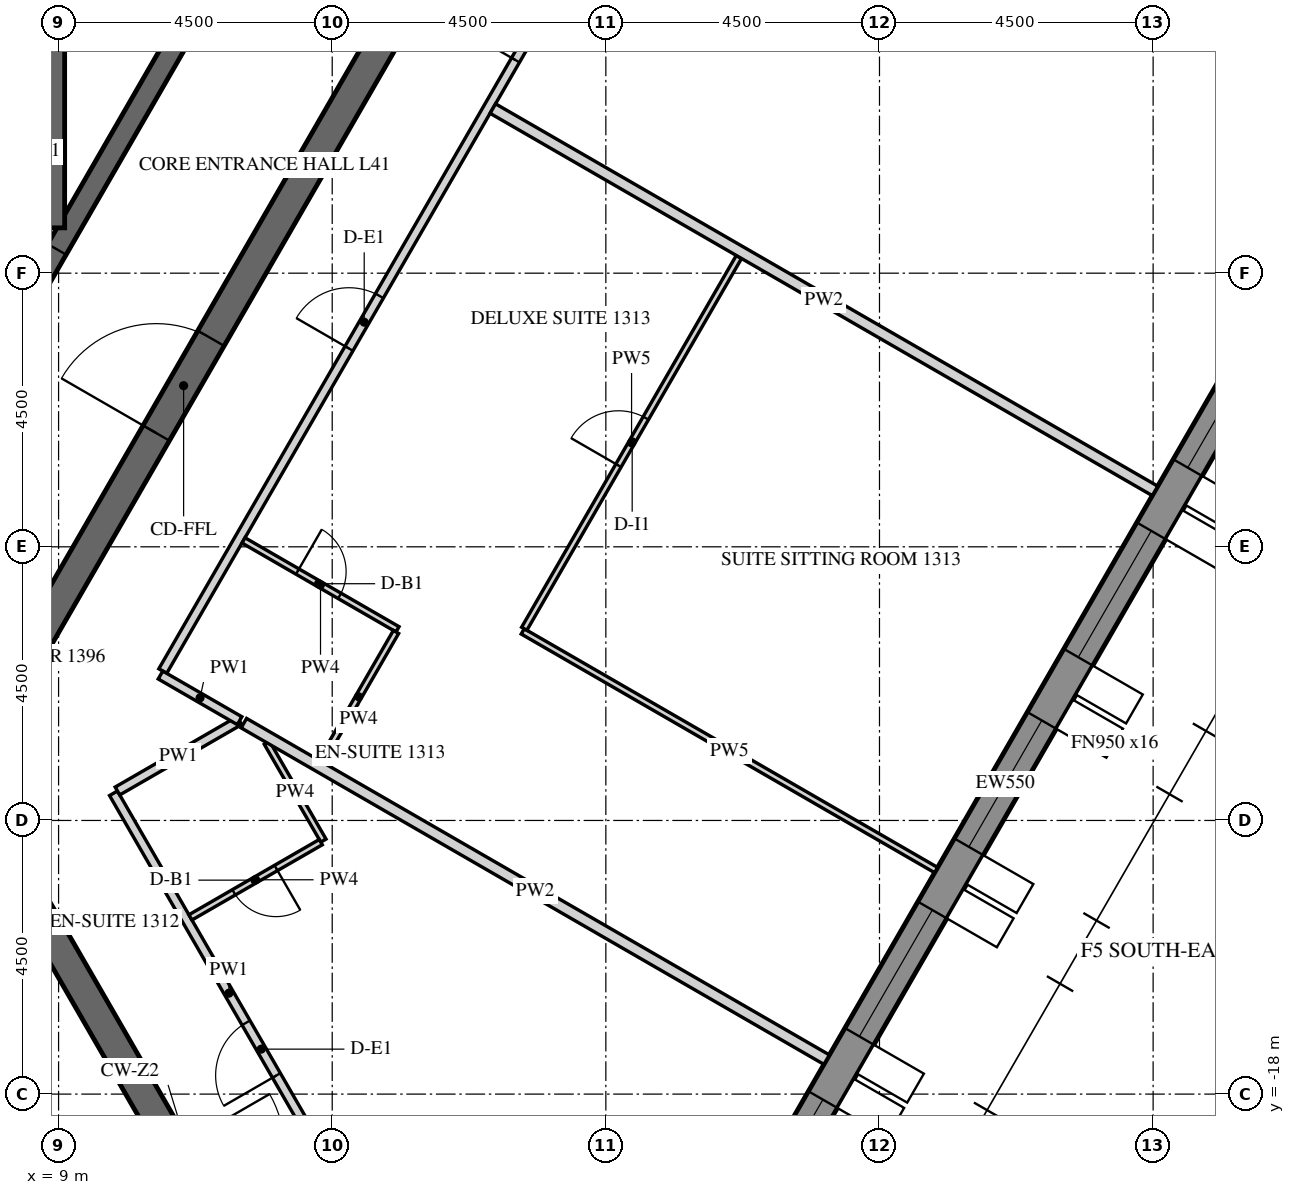
"""IFC4 building model, lengths in metres.
Left out: names, types, materials, properties, quantities, classifications, styles, units other than length and angle.
Written with IfcOpenShell. Run it as: python <this file> out.ifc"""

import sys

from ifc_helpers import new_model, si_unit, direction, frame, frame_2d, origin, place, context, subcontext, project, spatial, polyline, rectangle, outline, extrude, element, fill, save


model = new_model("IFC4")
c1 = context("Model", 3, precision=1e-05, world=origin(), true_north=direction((0.0, 1.0)))
c2 = subcontext(c1, "Body", "Model", "MODEL_VIEW")
j1 = project(units=[si_unit("LENGTHUNIT", "METRE"), si_unit("PLANEANGLEUNIT", "RADIAN")], contexts=[c1])
p1 = place(None, origin())
s1 = spatial("IfcSite", under=j1, at=p1, CompositionType="ELEMENT")
p2 = place(p1, origin())
s2 = spatial("IfcBuilding", under=s1, at=p2, CompositionType="ELEMENT")
p3 = place(p2, frame((0.0, 0.0, 176.1)))
s3 = spatial("IfcBuildingStorey", under=s2, at=p3, CompositionType="ELEMENT", Elevation=176.1)
p4 = place(p3, frame((17.63, -24.914, -0.15), z_axis=(0.0, 0.0, 1.0), x_axis=(0.499998569178, 0.866026229868, 0.0)))
e1 = element("IfcWall", 1, at=p4, inside=s3, PredefinedType="SOLIDWALL", context=c2, shape_type="SweptSolid", body=[
    extrude(outline(polyline([(-0.022, -0.275), (27.783, -0.275), (27.732, 0.275), (0.022, 0.275), (-0.022, -0.275)])), origin(), (0.0, 0.0, 1.0), 3.9),
])
p5 = place(p4, frame((1.879, 0.0, 1.05)))
e2 = element("IfcOpeningElement", 2, at=p5, cuts=e1, PredefinedType="OPENING", context=c2, shape_type="SweptSolid", body=[
    extrude(rectangle(XDim=2.4, YDim=2.4, at=frame_2d((1.2, 1.2))), frame((0.0, 0.285, 0.0), z_axis=(0.0, -1.0, 0.0), x_axis=(1.0, 0.0, 0.0)), (0.0, 0.0, 1.0), 0.57),
])
p6 = place(p4, frame((5.479, 0.0, 1.05)))
e3 = element("IfcOpeningElement", 3, at=p6, cuts=e1, PredefinedType="OPENING", context=c2, shape_type="SweptSolid", body=[
    extrude(rectangle(XDim=2.4, YDim=2.4, at=frame_2d((1.2, 1.2))), frame((0.0, 0.285, 0.0), z_axis=(0.0, -1.0, 0.0), x_axis=(1.0, 0.0, 0.0)), (0.0, 0.0, 1.0), 0.57),
])
p7 = place(p4, frame((9.079, 0.0, 1.05)))
e4 = element("IfcOpeningElement", 4, at=p7, cuts=e1, PredefinedType="OPENING", context=c2, shape_type="SweptSolid", body=[
    extrude(rectangle(XDim=2.4, YDim=2.4, at=frame_2d((1.2, 1.2))), frame((0.0, 0.285, 0.0), z_axis=(0.0, -1.0, 0.0), x_axis=(1.0, 0.0, 0.0)), (0.0, 0.0, 1.0), 0.57),
])
p8 = place(p4, frame((12.679, 0.0, 1.05)))
e5 = element("IfcOpeningElement", 5, at=p8, cuts=e1, PredefinedType="OPENING", context=c2, shape_type="SweptSolid", body=[
    extrude(rectangle(XDim=2.4, YDim=2.4, at=frame_2d((1.2, 1.2))), frame((0.0, 0.285, 0.0), z_axis=(0.0, -1.0, 0.0), x_axis=(1.0, 0.0, 0.0)), (0.0, 0.0, 1.0), 0.57),
])
p9 = place(p4, frame((16.279, 0.0, 1.05)))
e6 = element("IfcOpeningElement", 6, at=p9, cuts=e1, PredefinedType="OPENING", context=c2, shape_type="SweptSolid", body=[
    extrude(rectangle(XDim=2.4, YDim=2.4, at=frame_2d((1.2, 1.2))), frame((0.0, 0.285, 0.0), z_axis=(0.0, -1.0, 0.0), x_axis=(1.0, 0.0, 0.0)), (0.0, 0.0, 1.0), 0.57),
])
p10 = place(p4, frame((19.879, 0.0, 1.05)))
e7 = element("IfcOpeningElement", 7, at=p10, cuts=e1, PredefinedType="OPENING", context=c2, shape_type="SweptSolid", body=[
    extrude(rectangle(XDim=2.4, YDim=2.4, at=frame_2d((1.2, 1.2))), frame((0.0, 0.285, 0.0), z_axis=(0.0, -1.0, 0.0), x_axis=(1.0, 0.0, 0.0)), (0.0, 0.0, 1.0), 0.57),
])
p11 = place(p4, frame((23.479, 0.0, 1.05)))
e8 = element("IfcOpeningElement", 8, at=p11, cuts=e1, PredefinedType="OPENING", context=c2, shape_type="SweptSolid", body=[
    extrude(rectangle(XDim=2.4, YDim=2.4, at=frame_2d((1.2, 1.2))), frame((0.0, 0.285, 0.0), z_axis=(0.0, -1.0, 0.0), x_axis=(1.0, 0.0, 0.0)), (0.0, 0.0, 1.0), 0.57),
])
p12 = place(p3, frame((7.361, -12.75, -0.15), z_axis=(0.0, 0.0, 1.0), x_axis=(0.50000571537, 0.866022103989, 0.0)))
e9 = element("IfcWall", 9, at=p12, inside=s3, PredefinedType="SHEAR", context=c2, shape_type="SweptSolid", body=[
    extrude(outline(polyline([(-0.144, -0.25), (14.867, -0.25), (14.578, 0.25), (0.144, 0.25), (-0.144, -0.25)])), origin(), (0.0, 0.0, 1.0), 3.9),
])
p13 = place(p12, frame((6.49, 0.0, 0.15)))
e10 = element("IfcOpeningElement", 10, at=p13, cuts=e9, PredefinedType="OPENING", context=c2, shape_type="SweptSolid", body=[
    extrude(rectangle(XDim=1.8, YDim=2.4, at=frame_2d((0.9, 1.2))), frame((0.0, 0.26, 0.0), z_axis=(0.0, -1.0, 0.0), x_axis=(1.0, 0.0, 0.0)), (0.0, 0.0, 1.0), 0.52),
])
p14 = place(p3, frame((7.506, -13.0, -0.15), z_axis=(0.0, 0.0, 1.0), x_axis=(0.499988271576, -0.866032175087, 0.0)))
e11 = element("IfcWall", 11, at=p14, inside=s3, PredefinedType="SHEAR", context=c2, shape_type="SweptSolid", body=[
    extrude(rectangle(XDim=15.424, YDim=0.5, at=frame_2d((7.712, 0.0))), origin(), (0.0, 0.0, 1.0), 3.9),
])
p15 = place(p14, frame((6.812, 0.0, 0.15)))
e12 = element("IfcOpeningElement", 12, at=p15, cuts=e11, PredefinedType="OPENING", context=c2, shape_type="SweptSolid", body=[
    extrude(rectangle(XDim=1.8, YDim=2.4, at=frame_2d((0.9, 1.2))), frame((0.0, 0.26, 0.0), z_axis=(0.0, -1.0, 0.0), x_axis=(1.0, 0.0, 0.0)), (0.0, 0.0, 1.0), 0.52),
])
p16 = place(p3, frame((5.673, -9.825, -0.15), z_axis=(0.0, 0.0, 1.0), x_axis=(0.499995046907, 0.866028263435, 0.0)))
e13 = element("IfcWall", 13, at=p16, inside=s3, PredefinedType="SHEAR", context=c2, shape_type="SweptSolid", body=[
    extrude(outline(polyline([(-0.101, -0.175), (11.446, -0.175), (11.244, 0.175), (0.101, 0.175), (-0.101, -0.175)])), origin(), (0.0, 0.0, 1.0), 3.9),
])
p17 = place(p16, frame((4.801, 0.0, 0.15)))
e14 = element("IfcOpeningElement", 14, at=p17, cuts=e13, PredefinedType="OPENING", context=c2, shape_type="SweptSolid", body=[
    extrude(rectangle(XDim=1.8, YDim=2.4, at=frame_2d((0.9, 1.2))), frame((0.0, 0.185, 0.0), z_axis=(0.0, -1.0, 0.0), x_axis=(1.0, 0.0, 0.0)), (0.0, 0.0, 1.0), 0.37),
])
p18 = place(p3, frame((8.975, -3.755, -0.25), z_axis=(0.0, 0.0, 1.0), x_axis=(0.0, 1.0, 0.0)))
e15 = element("IfcWall", 15, at=p18, inside=s3, PredefinedType="SHEAR", context=c2, shape_type="SweptSolid", body=[
    extrude(rectangle(XDim=7.51, YDim=0.25, at=frame_2d((3.755, 0.0))), origin(), (0.0, 0.0, 1.0), 3.9),
])
p19 = place(p3, frame((6.221, -14.875, 0.0), z_axis=(0.0, 0.0, 1.0), x_axis=(0.499989830942, -0.866031274813, 0.0)))
e16 = element("IfcWall", 16, at=p19, inside=s3, PredefinedType="PARTITIONING", context=c2, shape_type="SweptSolid", body=[
    extrude(rectangle(XDim=7.93, YDim=0.15, at=frame_2d((3.965, 0.0))), origin(), (0.0, 0.0, 1.0), 2.988),
])
p20 = place(p3, frame((13.699, -19.628, 0.0), z_axis=(0.0, 0.0, 1.0), x_axis=(-0.499998968938, 0.866025999068, 0.0)))
e17 = element("IfcWall", 17, at=p20, inside=s3, PredefinedType="PARTITIONING", context=c2, shape_type="SweptSolid", body=[
    extrude(rectangle(XDim=7.592, YDim=0.15, at=frame_2d((3.796, 0.0))), origin(), (0.0, 0.0, 1.0), 2.988),
])
p21 = place(p20, frame((2.233, 0.0, 0.0)))
e18 = element("IfcOpeningElement", 18, at=p21, cuts=e17, PredefinedType="OPENING", context=c2, shape_type="SweptSolid", body=[
    extrude(rectangle(XDim=1.0, YDim=2.1, at=frame_2d((0.5, 1.05))), frame((0.0, 0.085, 0.0), z_axis=(0.0, -1.0, 0.0), x_axis=(1.0, 0.0, 0.0)), (0.0, 0.0, 1.0), 0.17),
])
p22 = place(p3, frame((9.968, -13.016, 0.0), z_axis=(0.0, 0.0, 1.0), x_axis=(0.866022320763, 0.500005339912, 0.0)))
e19 = element("IfcWall", 19, at=p22, inside=s3, PredefinedType="PARTITIONING", context=c2, shape_type="SweptSolid", body=[
    extrude(rectangle(XDim=2.316, YDim=0.15, at=frame_2d((1.158, 0.0))), origin(), (0.0, 0.0, 1.0), 2.988),
])
p23 = place(p3, frame((10.714, -11.043, 0.0), z_axis=(0.0, 0.0, 1.0), x_axis=(0.500001980452, 0.866024260367, 0.0)))
e20 = element("IfcWall", 20, at=p23, inside=s3, PredefinedType="PARTITIONING", context=c2, shape_type="SweptSolid", body=[
    extrude(rectangle(XDim=12.752, YDim=0.15, at=frame_2d((6.376, 0.0))), origin(), (0.0, 0.0, 1.0), 2.988),
])
p24 = place(p23, frame((6.125, 0.0, 0.0)))
e21 = element("IfcOpeningElement", 21, at=p24, cuts=e20, PredefinedType="OPENING", context=c2, shape_type="SweptSolid", body=[
    extrude(rectangle(XDim=1.0, YDim=2.1, at=frame_2d((0.5, 1.05))), frame((0.0, 0.085, 0.0), z_axis=(0.0, -1.0, 0.0), x_axis=(1.0, 0.0, 0.0)), (0.0, 0.0, 1.0), 0.17),
])
p25 = place(p23, frame((11.602, 0.0, 0.0)))
e22 = element("IfcOpeningElement", 22, at=p25, cuts=e20, PredefinedType="OPENING", context=c2, shape_type="SweptSolid", body=[
    extrude(rectangle(XDim=1.0, YDim=2.1, at=frame_2d((0.5, 1.05))), frame((0.0, 0.085, 0.0), z_axis=(0.0, -1.0, 0.0), x_axis=(1.0, 0.0, 0.0)), (0.0, 0.0, 1.0), 0.17),
])
p26 = place(p3, frame((11.977, -11.859, 0.0), z_axis=(0.0, 0.0, 1.0), x_axis=(-0.865993364801, 0.500055489042, 0.0)))
e23 = element("IfcWall", 23, at=p26, inside=s3, PredefinedType="PARTITIONING", context=c2, shape_type="SweptSolid", body=[
    extrude(rectangle(XDim=1.502, YDim=0.15, at=frame_2d((0.751, 0.0))), origin(), (0.0, 0.0, 1.0), 2.988),
])
p27 = place(p3, frame((12.426, -12.223, 0.0), z_axis=(0.0, 0.0, 1.0), x_axis=(0.499927229454, -0.866067413802, 0.0)))
e24 = element("IfcWall", 24, at=p27, inside=s3, PredefinedType="PARTITIONING", context=c2, shape_type="SweptSolid", body=[
    extrude(rectangle(XDim=1.858, YDim=0.1, at=frame_2d((0.929, 0.0))), origin(), (0.0, 0.0, 1.0), 2.988),
])
p28 = place(p3, frame((13.312, -13.857, 0.0), z_axis=(0.0, 0.0, 1.0), x_axis=(-0.866073894602, -0.499916002032, 0.0)))
e25 = element("IfcWall", 25, at=p28, inside=s3, PredefinedType="PARTITIONING", context=c2, shape_type="SweptSolid", body=[
    extrude(rectangle(XDim=2.475, YDim=0.1, at=frame_2d((1.238, 0.0))), origin(), (0.0, 0.0, 1.0), 2.988),
])
p29 = place(p28, frame((0.85, 0.0, 0.0)))
e26 = element("IfcOpeningElement", 26, at=p29, cuts=e25, PredefinedType="OPENING", context=c2, shape_type="SweptSolid", body=[
    extrude(rectangle(XDim=0.8, YDim=2.1, at=frame_2d((0.4, 1.05))), frame((0.0, 0.06, 0.0), z_axis=(0.0, -1.0, 0.0), x_axis=(1.0, 0.0, 0.0)), (0.0, 0.0, 1.0), 0.12),
])
p30 = place(p3, frame((21.631, -17.433, 0.0), z_axis=(0.0, 0.0, 1.0), x_axis=(-0.866031296205, 0.499989793889, 0.0)))
e27 = element("IfcWall", 27, at=p30, inside=s3, PredefinedType="PARTITIONING", context=c2, shape_type="SweptSolid", body=[
    extrude(rectangle(XDim=11.067, YDim=0.18, at=frame_2d((5.534, 0.0))), origin(), (0.0, 0.0, 1.0), 2.988),
])
p31 = place(p3, frame((12.041, -8.894, 0.0), z_axis=(0.0, 0.0, 1.0), x_axis=(0.866046596414, -0.499963291492, 0.0)))
e28 = element("IfcWall", 28, at=p31, inside=s3, PredefinedType="PARTITIONING", context=c2, shape_type="SweptSolid", body=[
    extrude(rectangle(XDim=2.925, YDim=0.1, at=frame_2d((1.462, 0.0))), origin(), (0.0, 0.0, 1.0), 2.988),
])
p32 = place(p31, frame((1.025, 0.0, 0.0)))
e29 = element("IfcOpeningElement", 29, at=p32, cuts=e28, PredefinedType="OPENING", context=c2, shape_type="SweptSolid", body=[
    extrude(rectangle(XDim=0.8, YDim=2.1, at=frame_2d((0.4, 1.05))), frame((0.0, 0.06, 0.0), z_axis=(0.0, -1.0, 0.0), x_axis=(1.0, 0.0, 0.0)), (0.0, 0.0, 1.0), 0.12),
])
p33 = place(p3, frame((14.549, -10.4, 0.0), z_axis=(0.0, 0.0, 1.0), x_axis=(-0.500003092839, -0.866023618125, 0.0)))
e30 = element("IfcWall", 30, at=p33, inside=s3, PredefinedType="PARTITIONING", context=c2, shape_type="SweptSolid", body=[
    extrude(rectangle(XDim=2.46, YDim=0.1, at=frame_2d((1.23, 0.0))), origin(), (0.0, 0.0, 1.0), 2.988),
])
p34 = place(p3, frame((23.431, -14.316, 0.0), z_axis=(0.0, 0.0, 1.0), x_axis=(-0.86602399778, 0.500002435262, 0.0)))
e31 = element("IfcWall", 31, at=p34, inside=s3, PredefinedType="PARTITIONING", context=c2, shape_type="SweptSolid", body=[
    extrude(rectangle(XDim=7.85, YDim=0.1, at=frame_2d((3.925, 0.0))), origin(), (0.0, 0.0, 1.0), 2.988),
])
p35 = place(p3, frame((16.658, -10.347, 0.0), z_axis=(0.0, 0.0, 1.0), x_axis=(0.500010820671, 0.866019156377, 0.0)))
e32 = element("IfcWall", 32, at=p35, inside=s3, PredefinedType="PARTITIONING", context=c2, shape_type="SweptSolid", body=[
    extrude(rectangle(XDim=7.06, YDim=0.1, at=frame_2d((3.53, 0.0))), origin(), (0.0, 0.0, 1.0), 2.988),
])
p36 = place(p35, frame((3.1, 0.0, 0.0)))
e33 = element("IfcOpeningElement", 33, at=p36, cuts=e32, PredefinedType="OPENING", context=c2, shape_type="SweptSolid", body=[
    extrude(rectangle(XDim=0.9, YDim=2.1, at=frame_2d((0.45, 1.05))), frame((0.0, 0.06, 0.0), z_axis=(0.0, -1.0, 0.0), x_axis=(1.0, 0.0, 0.0)), (0.0, 0.0, 1.0), 0.12),
])
p37 = place(p3, frame((27.031, -8.08, 0.0), z_axis=(0.0, 0.0, 1.0), x_axis=(-0.86602780907, 0.499995833901, 0.0)))
e34 = element("IfcWall", 34, at=p37, inside=s3, PredefinedType="PARTITIONING", context=c2, shape_type="SweptSolid", body=[
    extrude(rectangle(XDim=12.575, YDim=0.18, at=frame_2d((6.287, 0.0))), origin(), (0.0, 0.0, 1.0), 2.988),
])
p38 = place(p6, frame((0.0, 0.205, 0.0)))
e35 = element("IfcWindow", 35, at=p38, inside=s3, PartitioningType="DOUBLE_PANEL_VERTICAL", PredefinedType="WINDOW", context=c2, shape_type="SweptSolid", body=[
    extrude(rectangle(XDim=2.4, YDim=2.4, at=frame_2d((1.2, 1.2))), frame((0.0, 0.03, 0.0), z_axis=(0.0, -1.0, 0.0), x_axis=(1.0, 0.0, 0.0)), (0.0, 0.0, 1.0), 0.06),
])
fill(e3, e35)
p39 = place(p7, frame((0.0, 0.205, 0.0)))
e36 = element("IfcWindow", 36, at=p39, inside=s3, PartitioningType="DOUBLE_PANEL_VERTICAL", PredefinedType="WINDOW", context=c2, shape_type="SweptSolid", body=[
    extrude(rectangle(XDim=2.4, YDim=2.4, at=frame_2d((1.2, 1.2))), frame((0.0, 0.03, 0.0), z_axis=(0.0, -1.0, 0.0), x_axis=(1.0, 0.0, 0.0)), (0.0, 0.0, 1.0), 0.06),
])
fill(e4, e36)
p40 = place(p8, frame((0.0, 0.205, 0.0)))
e37 = element("IfcWindow", 37, at=p40, inside=s3, PartitioningType="DOUBLE_PANEL_VERTICAL", PredefinedType="WINDOW", context=c2, shape_type="SweptSolid", body=[
    extrude(rectangle(XDim=2.4, YDim=2.4, at=frame_2d((1.2, 1.2))), frame((0.0, 0.03, 0.0), z_axis=(0.0, -1.0, 0.0), x_axis=(1.0, 0.0, 0.0)), (0.0, 0.0, 1.0), 0.06),
])
fill(e5, e37)
p41 = place(p9, frame((0.0, 0.205, 0.0)))
e38 = element("IfcWindow", 38, at=p41, inside=s3, PartitioningType="DOUBLE_PANEL_VERTICAL", PredefinedType="WINDOW", context=c2, shape_type="SweptSolid", body=[
    extrude(rectangle(XDim=2.4, YDim=2.4, at=frame_2d((1.2, 1.2))), frame((0.0, 0.03, 0.0), z_axis=(0.0, -1.0, 0.0), x_axis=(1.0, 0.0, 0.0)), (0.0, 0.0, 1.0), 0.06),
])
fill(e6, e38)
p42 = place(p10, frame((0.0, 0.205, 0.0)))
e39 = element("IfcWindow", 39, at=p42, inside=s3, PartitioningType="DOUBLE_PANEL_VERTICAL", PredefinedType="WINDOW", context=c2, shape_type="SweptSolid", body=[
    extrude(rectangle(XDim=2.4, YDim=2.4, at=frame_2d((1.2, 1.2))), frame((0.0, 0.03, 0.0), z_axis=(0.0, -1.0, 0.0), x_axis=(1.0, 0.0, 0.0)), (0.0, 0.0, 1.0), 0.06),
])
fill(e7, e39)
p43 = place(p13, origin())
e40 = element("IfcDoor", 40, at=p43, inside=s3, OperationType="DOUBLE_DOOR_SINGLE_SWING", PredefinedType="DOOR", context=c2, shape_type="SweptSolid", body=[
    extrude(rectangle(XDim=1.8, YDim=2.4, at=frame_2d((0.9, 1.2))), frame((0.0, 0.025, 0.0), z_axis=(0.0, -1.0, 0.0), x_axis=(1.0, 0.0, 0.0)), (0.0, 0.0, 1.0), 0.05),
])
fill(e10, e40)
p44 = place(p17, origin())
e41 = element("IfcDoor", 41, at=p44, inside=s3, OperationType="DOUBLE_DOOR_SINGLE_SWING", PredefinedType="DOOR", context=c2, shape_type="SweptSolid", body=[
    extrude(rectangle(XDim=1.8, YDim=2.4, at=frame_2d((0.9, 1.2))), frame((0.0, 0.025, 0.0), z_axis=(0.0, -1.0, 0.0), x_axis=(1.0, 0.0, 0.0)), (0.0, 0.0, 1.0), 0.05),
])
fill(e14, e41)
p45 = place(p21, origin())
e42 = element("IfcDoor", 42, at=p45, inside=s3, OperationType="SINGLE_SWING_LEFT", PredefinedType="DOOR", context=c2, shape_type="SweptSolid", body=[
    extrude(rectangle(XDim=1.0, YDim=2.1, at=frame_2d((0.5, 1.05))), frame((0.0, 0.025, 0.0), z_axis=(0.0, -1.0, 0.0), x_axis=(1.0, 0.0, 0.0)), (0.0, 0.0, 1.0), 0.05),
])
fill(e18, e42)
p46 = place(p29, origin())
e43 = element("IfcDoor", 43, at=p46, inside=s3, OperationType="SINGLE_SWING_LEFT", PredefinedType="DOOR", context=c2, shape_type="SweptSolid", body=[
    extrude(rectangle(XDim=0.8, YDim=2.1, at=frame_2d((0.4, 1.05))), frame((0.0, 0.025, 0.0), z_axis=(0.0, -1.0, 0.0), x_axis=(1.0, 0.0, 0.0)), (0.0, 0.0, 1.0), 0.05),
])
fill(e26, e43)
p47 = place(p24, origin())
e44 = element("IfcDoor", 44, at=p47, inside=s3, OperationType="SINGLE_SWING_LEFT", PredefinedType="DOOR", context=c2, shape_type="SweptSolid", body=[
    extrude(rectangle(XDim=1.0, YDim=2.1, at=frame_2d((0.5, 1.05))), frame((0.0, 0.025, 0.0), z_axis=(0.0, -1.0, 0.0), x_axis=(1.0, 0.0, 0.0)), (0.0, 0.0, 1.0), 0.05),
])
fill(e21, e44)
p48 = place(p32, origin())
e45 = element("IfcDoor", 45, at=p48, inside=s3, OperationType="SINGLE_SWING_RIGHT", PredefinedType="DOOR", context=c2, shape_type="SweptSolid", body=[
    extrude(rectangle(XDim=0.8, YDim=2.1, at=frame_2d((0.4, 1.05))), frame((0.0, 0.025, 0.0), z_axis=(0.0, -1.0, 0.0), x_axis=(1.0, 0.0, 0.0)), (0.0, 0.0, 1.0), 0.05),
])
fill(e29, e45)
p49 = place(p36, origin())
e46 = element("IfcDoor", 46, at=p49, inside=s3, OperationType="SINGLE_SWING_RIGHT", PredefinedType="DOOR", context=c2, shape_type="SweptSolid", body=[
    extrude(rectangle(XDim=0.9, YDim=2.1, at=frame_2d((0.45, 1.05))), frame((0.0, 0.025, 0.0), z_axis=(0.0, -1.0, 0.0), x_axis=(1.0, 0.0, 0.0)), (0.0, 0.0, 1.0), 0.05),
])
fill(e33, e46)
p50 = place(p25, origin())
e47 = element("IfcDoor", 47, at=p50, inside=s3, OperationType="SINGLE_SWING_LEFT", PredefinedType="DOOR", context=c2, shape_type="SweptSolid", body=[
    extrude(rectangle(XDim=1.0, YDim=2.1, at=frame_2d((0.5, 1.05))), frame((0.0, 0.025, 0.0), z_axis=(0.0, -1.0, 0.0), x_axis=(1.0, 0.0, 0.0)), (0.0, 0.0, 1.0), 0.05),
])
fill(e22, e47)
save(model, sys.argv[1])
